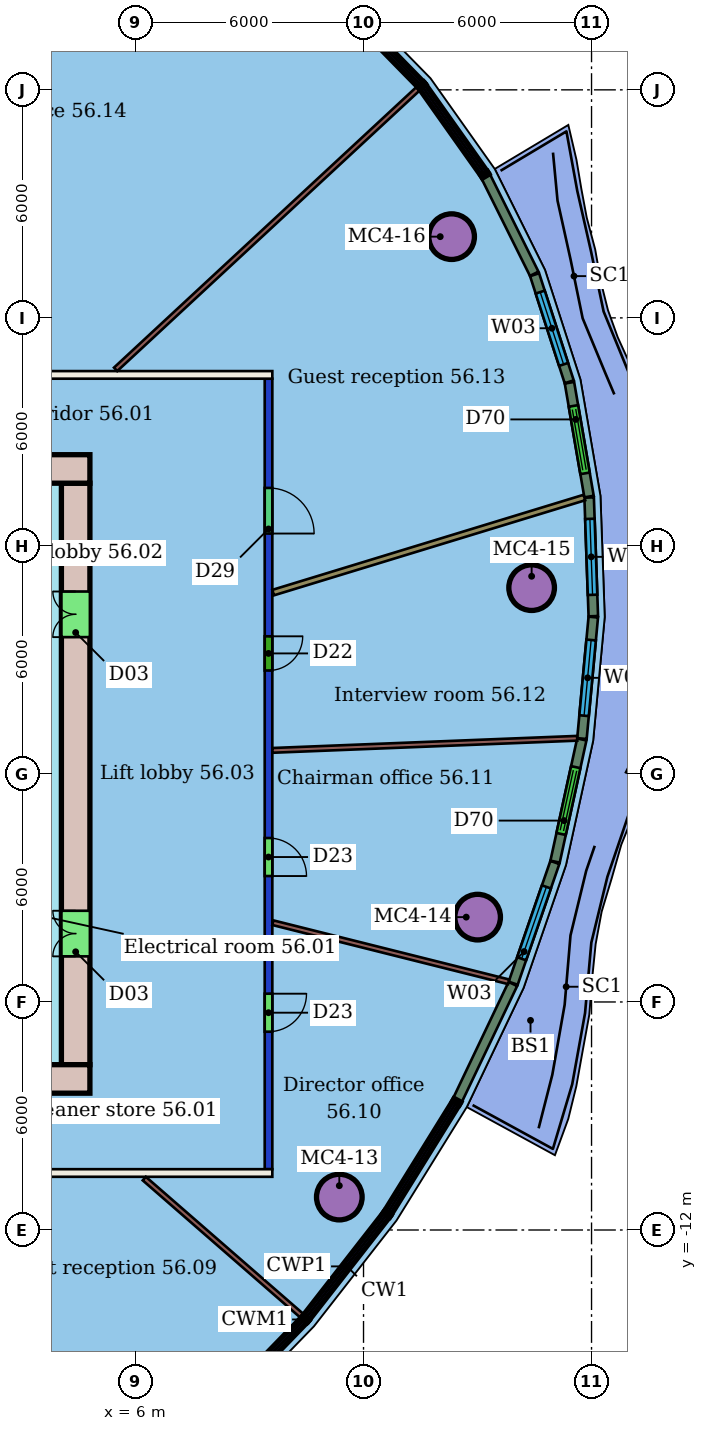
"""IFC4 building model, lengths in metres.
Left out: names, types, materials, properties, quantities, classifications, styles, units other than length and angle.
Written with IfcOpenShell. Run it as: python <this file> out.ifc"""

import sys

from ifc_helpers import new_model, si_unit, direction, frame, frame_2d, origin, origin_2d, place, context, subcontext, project, spatial, rectangle, hollow_circle, extrude, element, fill, save


model = new_model("IFC4")
c1 = context("Model", 3, precision=1e-05, world=origin(), true_north=direction((0.0, 1.0)))
c2 = subcontext(c1, "Body", "Model", "MODEL_VIEW")
j1 = project(units=[si_unit("LENGTHUNIT", "METRE"), si_unit("PLANEANGLEUNIT", "RADIAN")], contexts=[c1])
p1 = place(None, origin())
s1 = spatial("IfcSite", under=j1, at=p1, CompositionType="ELEMENT")
p2 = place(p1, origin())
s2 = spatial("IfcBuilding", under=s1, at=p2, CompositionType="ELEMENT")
p3 = place(p2, frame((0.0, 0.0, 228.1)))
s3 = spatial("IfcBuildingStorey", under=s2, at=p3, CompositionType="ELEMENT", Elevation=228.1)
for number, where, z_axis, x_axis in (
    (1, (11.363, -11.134, 0.0), (0.0, 0.0, 1.0), (1.0, 0.0, 0.0)),
    (2, (15.003, -3.768, 0.0), (0.0, 0.0, 1.0), (1.0, 0.0, 0.0)),
    (3, (16.424, 4.901, 0.0), (0.0, 0.0, 1.0), (1.0, 0.0, 0.0)),
    (4, (14.318, 14.137, 0.0), (0.0, 0.0, 1.0), (1.0, 0.0, 0.0)),
):
    element("IfcColumn", number, at=place(p3, frame(where, z_axis=z_axis, x_axis=x_axis)), inside=s3, PredefinedType="COLUMN", context=c2, shape_type="SweptSolid", body=[
        extrude(hollow_circle(Radius=0.6, WallThickness=0.045, at=origin_2d()), origin(), (0.0, 0.0, 1.0), 3.45),
    ])
p4 = place(p3, frame((9.6, -10.5, 0.0), z_axis=(0.0, 0.0, 1.0), x_axis=(-1.0, 0.0, 0.0)))
e5 = element("IfcWall", 5, at=p4, inside=s3, PredefinedType="PARTITIONING", context=c2, shape_type="SweptSolid", body=[
    extrude(rectangle(XDim=31.2, YDim=0.2, at=frame_2d((15.6, 0.0))), origin(), (0.0, 0.0, 1.0), 3.45),
])
p5 = place(p4, frame((26.604, 0.0, 0.0)))
e6 = element("IfcOpeningElement", 6, at=p5, cuts=e5, PredefinedType="OPENING", context=c2, shape_type="SweptSolid", body=[
    extrude(rectangle(XDim=1.0, YDim=2.4, at=frame_2d((0.5, 1.2))), frame((0.0, 0.11, 0.0), z_axis=(0.0, -1.0, 0.0), x_axis=(1.0, 0.0, 0.0)), (0.0, 0.0, 1.0), 0.22),
])
p6 = place(p4, frame((20.195, 0.0, 0.0)))
e7 = element("IfcOpeningElement", 7, at=p6, cuts=e5, PredefinedType="OPENING", context=c2, shape_type="SweptSolid", body=[
    extrude(rectangle(XDim=1.5, YDim=2.1, at=frame_2d((0.75, 1.05))), frame((0.0, 0.11, 0.0), z_axis=(0.0, -1.0, 0.0), x_axis=(1.0, 0.0, 0.0)), (0.0, 0.0, 1.0), 0.22),
])
p7 = place(p4, frame((16.532, 0.0, 0.0)))
e8 = element("IfcOpeningElement", 8, at=p7, cuts=e5, PredefinedType="OPENING", context=c2, shape_type="SweptSolid", body=[
    extrude(rectangle(XDim=1.0, YDim=2.4, at=frame_2d((0.5, 1.2))), frame((0.0, 0.11, 0.0), z_axis=(0.0, -1.0, 0.0), x_axis=(1.0, 0.0, 0.0)), (0.0, 0.0, 1.0), 0.22),
])
p8 = place(p4, frame((10.772, 0.0, 0.0)))
e9 = element("IfcOpeningElement", 9, at=p8, cuts=e5, PredefinedType="OPENING", context=c2, shape_type="SweptSolid", body=[
    extrude(rectangle(XDim=0.9, YDim=2.1, at=frame_2d((0.45, 1.05))), frame((0.0, 0.11, 0.0), z_axis=(0.0, -1.0, 0.0), x_axis=(1.0, 0.0, 0.0)), (0.0, 0.0, 1.0), 0.22),
])
p9 = place(p4, frame((6.524, 0.0, 0.0)))
e10 = element("IfcOpeningElement", 10, at=p9, cuts=e5, PredefinedType="OPENING", context=c2, shape_type="SweptSolid", body=[
    extrude(rectangle(XDim=1.2, YDim=2.4, at=frame_2d((0.6, 1.2))), frame((0.0, 0.11, 0.0), z_axis=(0.0, -1.0, 0.0), x_axis=(1.0, 0.0, 0.0)), (0.0, 0.0, 1.0), 0.22),
])
p10 = place(p3, frame((-21.6, 10.5, 0.0), z_axis=(0.0, 0.0, 1.0), x_axis=(1.0, 0.0, 0.0)))
e11 = element("IfcWall", 11, at=p10, inside=s3, PredefinedType="PARTITIONING", context=c2, shape_type="SweptSolid", body=[
    extrude(rectangle(XDim=31.2, YDim=0.2, at=frame_2d((15.6, 0.0))), origin(), (0.0, 0.0, 1.0), 3.45),
])
p11 = place(p10, frame((11.157, 0.0, 0.0)))
e12 = element("IfcOpeningElement", 12, at=p11, cuts=e11, PredefinedType="OPENING", context=c2, shape_type="SweptSolid", body=[
    extrude(rectangle(XDim=1.0, YDim=2.4, at=frame_2d((0.5, 1.2))), frame((0.0, 0.11, 0.0), z_axis=(0.0, -1.0, 0.0), x_axis=(1.0, 0.0, 0.0)), (0.0, 0.0, 1.0), 0.22),
])
p12 = place(p10, frame((5.712, 0.0, 0.0)))
e13 = element("IfcOpeningElement", 13, at=p12, cuts=e11, PredefinedType="OPENING", context=c2, shape_type="SweptSolid", body=[
    extrude(rectangle(XDim=0.9, YDim=2.1, at=frame_2d((0.45, 1.05))), frame((0.0, 0.11, 0.0), z_axis=(0.0, -1.0, 0.0), x_axis=(1.0, 0.0, 0.0)), (0.0, 0.0, 1.0), 0.22),
])
p13 = place(p10, frame((18.9, 0.0, 0.0)))
e14 = element("IfcOpeningElement", 14, at=p13, cuts=e11, PredefinedType="OPENING", context=c2, shape_type="SweptSolid", body=[
    extrude(rectangle(XDim=1.8, YDim=2.1, at=frame_2d((0.9, 1.05))), frame((0.0, 0.11, 0.0), z_axis=(0.0, -1.0, 0.0), x_axis=(1.0, 0.0, 0.0)), (0.0, 0.0, 1.0), 0.22),
])
p14 = place(p3, frame((9.5, 10.4, 0.0), z_axis=(0.0, 0.0, 1.0), x_axis=(0.0, -1.0, 0.0)))
e15 = element("IfcWall", 15, at=p14, inside=s3, PredefinedType="PARTITIONING", context=c2, shape_type="SweptSolid", body=[
    extrude(rectangle(XDim=20.8, YDim=0.2, at=frame_2d((10.4, 0.0))), origin(), (0.0, 0.0, 1.0), 3.05),
])
p15 = place(p14, frame((16.182, 0.0, 0.0)))
e16 = element("IfcOpeningElement", 16, at=p15, cuts=e15, PredefinedType="OPENING", context=c2, shape_type="SweptSolid", body=[
    extrude(rectangle(XDim=1.0, YDim=2.4, at=frame_2d((0.5, 1.2))), frame((0.0, 0.11, 0.0), z_axis=(0.0, -1.0, 0.0), x_axis=(1.0, 0.0, 0.0)), (0.0, 0.0, 1.0), 0.22),
])
p16 = place(p14, frame((12.086, 0.0, 0.0)))
e17 = element("IfcOpeningElement", 17, at=p16, cuts=e15, PredefinedType="OPENING", context=c2, shape_type="SweptSolid", body=[
    extrude(rectangle(XDim=1.0, YDim=2.4, at=frame_2d((0.5, 1.2))), frame((0.0, 0.11, 0.0), z_axis=(0.0, -1.0, 0.0), x_axis=(1.0, 0.0, 0.0)), (0.0, 0.0, 1.0), 0.22),
])
p17 = place(p14, frame((6.779, 0.0, 0.0)))
e18 = element("IfcOpeningElement", 18, at=p17, cuts=e15, PredefinedType="OPENING", context=c2, shape_type="SweptSolid", body=[
    extrude(rectangle(XDim=0.9, YDim=2.1, at=frame_2d((0.45, 1.05))), frame((0.0, 0.11, 0.0), z_axis=(0.0, -1.0, 0.0), x_axis=(1.0, 0.0, 0.0)), (0.0, 0.0, 1.0), 0.22),
])
p18 = place(p14, frame((2.875, 0.0, 0.0)))
e19 = element("IfcOpeningElement", 19, at=p18, cuts=e15, PredefinedType="OPENING", context=c2, shape_type="SweptSolid", body=[
    extrude(rectangle(XDim=1.2, YDim=2.4, at=frame_2d((0.6, 1.2))), frame((0.0, 0.11, 0.0), z_axis=(0.0, -1.0, 0.0), x_axis=(1.0, 0.0, 0.0)), (0.0, 0.0, 1.0), 0.22),
])
p19 = place(p3, frame((5.283, -18.97, 0.0), z_axis=(0.0, 0.0, 1.0), x_axis=(-0.511199592551, 0.859462027419, 0.0)))
e20 = element("IfcWall", 20, at=p19, inside=s3, PredefinedType="PARTITIONING", context=c2, shape_type="SweptSolid", body=[
    extrude(rectangle(XDim=9.695, YDim=0.15, at=frame_2d((4.847, 0.0))), origin(), (0.0, 0.0, 1.0), 3.45),
])
p20 = place(p3, frame((10.375, -14.255, 0.0), z_axis=(0.0, 0.0, 1.0), x_axis=(-0.754250521581, 0.656586742704, 0.0)))
e21 = element("IfcWall", 21, at=p20, inside=s3, PredefinedType="PARTITIONING", context=c2, shape_type="SweptSolid", body=[
    extrude(rectangle(XDim=5.495, YDim=0.125, at=frame_2d((2.747, 0.0))), origin(), (0.0, 0.0, 1.0), 3.45),
])
p21 = place(p3, frame((15.819, -5.469, 0.0), z_axis=(0.0, 0.0, 1.0), x_axis=(-0.969994115185, 0.243128395105, 0.0)))
e22 = element("IfcWall", 22, at=p21, inside=s3, PredefinedType="PARTITIONING", context=c2, shape_type="SweptSolid", body=[
    extrude(rectangle(XDim=6.396, YDim=0.125, at=frame_2d((3.198, 0.0))), origin(), (0.0, 0.0, 1.0), 3.45),
])
p22 = place(p3, frame((17.623, 0.938, 0.0), z_axis=(0.0, 0.0, 1.0), x_axis=(-0.99921190204, -0.03969351107, 0.0)))
e23 = element("IfcWall", 23, at=p22, inside=s3, PredefinedType="PARTITIONING", context=c2, shape_type="SweptSolid", body=[
    extrude(rectangle(XDim=8.027, YDim=0.125, at=frame_2d((4.013, 0.0))), origin(), (0.0, 0.0, 1.0), 3.45),
])
p23 = place(p3, frame((17.812, 7.273, 0.0), z_axis=(0.0, 0.0, 1.0), x_axis=(-0.956387195005, -0.292101922676, 0.0)))
e24 = element("IfcWall", 24, at=p23, inside=s3, PredefinedType="PARTITIONING", context=c2, shape_type="SweptSolid", body=[
    extrude(rectangle(XDim=8.564, YDim=0.15, at=frame_2d((4.282, 0.0))), origin(), (0.0, 0.0, 1.0), 3.45),
])
p24 = place(p3, frame((13.437, 18.031, 0.0), z_axis=(0.0, 0.0, 1.0), x_axis=(-0.733128123603, -0.680090548665, 0.0)))
e25 = element("IfcWall", 25, at=p24, inside=s3, PredefinedType="PARTITIONING", context=c2, shape_type="SweptSolid", body=[
    extrude(rectangle(XDim=10.859, YDim=0.125, at=frame_2d((5.429, 0.0))), origin(), (0.0, 0.0, 1.0), 3.45),
])
p25 = place(p3, frame((14.478, -8.572, 0.0), z_axis=(0.0, 0.0, 1.0), x_axis=(0.430461639922, 0.902608872411, 0.0)))
e26 = element("IfcWall", 26, at=p25, inside=s3, PredefinedType="SOLIDWALL", context=c2, shape_type="SweptSolid", body=[
    extrude(rectangle(XDim=3.374, YDim=0.25, at=frame_2d((1.687, 0.0))), origin(), (0.0, 0.0, 1.0), 3.1),
])
p26 = place(p3, frame((15.938, -5.506, 0.0), z_axis=(0.0, 0.0, 1.0), x_axis=(0.326124986631, 0.945326659465, 0.0)))
e27 = element("IfcWall", 27, at=p26, inside=s3, PredefinedType="SOLIDWALL", context=c2, shape_type="SweptSolid", body=[
    extrude(rectangle(XDim=3.361, YDim=0.25, at=frame_2d((1.681, 0.0))), origin(), (0.0, 0.0, 1.0), 3.1),
])
p27 = place(p26, frame((0.681, 0.0, 0.9)))
e28 = element("IfcOpeningElement", 28, at=p27, cuts=e27, PredefinedType="OPENING", context=c2, shape_type="SweptSolid", body=[
    extrude(rectangle(XDim=2.0, YDim=2.1, at=frame_2d((1.0, 1.05))), frame((0.0, 0.135, 0.0), z_axis=(0.0, -1.0, 0.0), x_axis=(1.0, 0.0, 0.0)), (0.0, 0.0, 1.0), 0.27),
])
p28 = place(p3, frame((17.041, -2.307, 0.0), z_axis=(0.0, 0.0, 1.0), x_axis=(0.213732278163, 0.976892273115, 0.0)))
e29 = element("IfcWall", 29, at=p28, inside=s3, PredefinedType="SOLIDWALL", context=c2, shape_type="SweptSolid", body=[
    extrude(rectangle(XDim=3.291, YDim=0.25, at=frame_2d((1.646, 0.0))), origin(), (0.0, 0.0, 1.0), 3.1),
])
p29 = place(p28, frame((0.745, 0.0, 0.0)))
e30 = element("IfcOpeningElement", 30, at=p29, cuts=e29, PredefinedType="OPENING", context=c2, shape_type="SweptSolid", body=[
    extrude(rectangle(XDim=1.8, YDim=2.4, at=frame_2d((0.9, 1.2))), frame((0.0, 0.135, 0.0), z_axis=(0.0, -1.0, 0.0), x_axis=(1.0, 0.0, 0.0)), (0.0, 0.0, 1.0), 0.27),
])
p30 = place(p3, frame((17.747, 0.931, 0.0), z_axis=(0.0, 0.0, 1.0), x_axis=(0.093086270193, 0.995658046872, 0.0)))
e31 = element("IfcWall", 31, at=p30, inside=s3, PredefinedType="SOLIDWALL", context=c2, shape_type="SweptSolid", body=[
    extrude(rectangle(XDim=3.21, YDim=0.25, at=frame_2d((1.605, 0.0))), origin(), (0.0, 0.0, 1.0), 3.1),
])
p31 = place(p30, frame((0.605, 0.0, 0.9)))
e32 = element("IfcOpeningElement", 32, at=p31, cuts=e31, PredefinedType="OPENING", context=c2, shape_type="SweptSolid", body=[
    extrude(rectangle(XDim=2.0, YDim=2.1, at=frame_2d((1.0, 1.05))), frame((0.0, 0.135, 0.0), z_axis=(0.0, -1.0, 0.0), x_axis=(1.0, 0.0, 0.0)), (0.0, 0.0, 1.0), 0.27),
])
p32 = place(p3, frame((18.047, 4.151, 0.0), z_axis=(0.0, 0.0, 1.0), x_axis=(-0.035161980599, 0.999381626367, 0.0)))
e33 = element("IfcWall", 33, at=p32, inside=s3, PredefinedType="SOLIDWALL", context=c2, shape_type="SweptSolid", body=[
    extrude(rectangle(XDim=3.125, YDim=0.25, at=frame_2d((1.562, 0.0))), origin(), (0.0, 0.0, 1.0), 3.1),
])
p33 = place(p32, frame((0.562, 0.0, 0.9)))
e34 = element("IfcOpeningElement", 34, at=p33, cuts=e33, PredefinedType="OPENING", context=c2, shape_type="SweptSolid", body=[
    extrude(rectangle(XDim=2.0, YDim=2.1, at=frame_2d((1.0, 1.05))), frame((0.0, 0.135, 0.0), z_axis=(0.0, -1.0, 0.0), x_axis=(1.0, 0.0, 0.0)), (0.0, 0.0, 1.0), 0.27),
])
p34 = place(p3, frame((17.934, 7.298, 0.0), z_axis=(0.0, 0.0, 1.0), x_axis=(-0.169645994058, 0.985505066806, 0.0)))
e35 = element("IfcWall", 35, at=p34, inside=s3, PredefinedType="SOLIDWALL", context=c2, shape_type="SweptSolid", body=[
    extrude(rectangle(XDim=3.039, YDim=0.25, at=frame_2d((1.52, 0.0))), origin(), (0.0, 0.0, 1.0), 3.1),
])
p35 = place(p34, frame((0.62, 0.0, 0.0)))
e36 = element("IfcOpeningElement", 36, at=p35, cuts=e35, PredefinedType="OPENING", context=c2, shape_type="SweptSolid", body=[
    extrude(rectangle(XDim=1.8, YDim=2.4, at=frame_2d((0.9, 1.2))), frame((0.0, 0.135, 0.0), z_axis=(0.0, -1.0, 0.0), x_axis=(1.0, 0.0, 0.0)), (0.0, 0.0, 1.0), 0.27),
])
p36 = place(p3, frame((17.413, 10.319, 0.0), z_axis=(0.0, 0.0, 1.0), x_axis=(-0.307706130581, 0.951481443436, 0.0)))
e37 = element("IfcWall", 37, at=p36, inside=s3, PredefinedType="SOLIDWALL", context=c2, shape_type="SweptSolid", body=[
    extrude(rectangle(XDim=2.961, YDim=0.25, at=frame_2d((1.48, 0.0))), origin(), (0.0, 0.0, 1.0), 3.1),
])
p37 = place(p36, frame((0.48, 0.0, 0.9)))
e38 = element("IfcOpeningElement", 38, at=p37, cuts=e37, PredefinedType="OPENING", context=c2, shape_type="SweptSolid", body=[
    extrude(rectangle(XDim=2.0, YDim=2.1, at=frame_2d((1.0, 1.05))), frame((0.0, 0.135, 0.0), z_axis=(0.0, -1.0, 0.0), x_axis=(1.0, 0.0, 0.0)), (0.0, 0.0, 1.0), 0.27),
])
p38 = place(p3, frame((16.491, 13.16, 0.0), z_axis=(0.0, 0.0, 1.0), x_axis=(-0.445536061048, 0.895263993639, 0.0)))
e39 = element("IfcWall", 39, at=p38, inside=s3, PredefinedType="SOLIDWALL", context=c2, shape_type="SweptSolid", body=[
    extrude(rectangle(XDim=2.854, YDim=0.25, at=frame_2d((1.427, 0.0))), origin(), (0.0, 0.0, 1.0), 3.1),
])
p39 = place(p3, frame((4.8, 8.025, 0.0), z_axis=(0.0, 0.0, 1.0), x_axis=(-1.0, 0.0, 0.0)))
e40 = element("IfcWall", 40, at=p39, inside=s3, PredefinedType="SHEAR", context=c2, shape_type="SweptSolid", body=[
    extrude(rectangle(XDim=10.8, YDim=0.75, at=frame_2d((5.4, 0.0))), origin(), (0.0, 0.0, 1.0), 3.3),
])
p40 = place(p39, frame((4.4, 0.0, 0.0)))
e41 = element("IfcOpeningElement", 41, at=p40, cuts=e40, PredefinedType="OPENING", context=c2, shape_type="SweptSolid", body=[
    extrude(rectangle(XDim=1.2, YDim=2.1, at=frame_2d((0.6, 1.05))), frame((0.0, 0.385, 0.0), z_axis=(0.0, -1.0, 0.0), x_axis=(1.0, 0.0, 0.0)), (0.0, 0.0, 1.0), 0.77),
])
p41 = place(p3, frame((-16.8, -8.025, 0.0), z_axis=(0.0, 0.0, 1.0), x_axis=(1.0, 0.0, 0.0)))
e42 = element("IfcWall", 42, at=p41, inside=s3, PredefinedType="SHEAR", context=c2, shape_type="SweptSolid", body=[
    extrude(rectangle(XDim=21.6, YDim=0.75, at=frame_2d((10.8, 0.0))), origin(), (0.0, 0.0, 1.0), 3.3),
])
p42 = place(p41, frame((4.8, 0.0, 0.0)))
e43 = element("IfcOpeningElement", 43, at=p42, cuts=e42, PredefinedType="OPENING", context=c2, shape_type="SweptSolid", body=[
    extrude(rectangle(XDim=1.2, YDim=2.1, at=frame_2d((0.6, 1.05))), frame((0.0, 0.385, 0.0), z_axis=(0.0, -1.0, 0.0), x_axis=(1.0, 0.0, 0.0)), (0.0, 0.0, 1.0), 0.77),
])
p43 = place(p3, frame((4.425, -7.65, 0.0), z_axis=(0.0, 0.0, 1.0), x_axis=(0.0, 1.0, 0.0)))
e44 = element("IfcWall", 44, at=p43, inside=s3, PredefinedType="SHEAR", context=c2, shape_type="SweptSolid", body=[
    extrude(rectangle(XDim=15.3, YDim=0.75, at=frame_2d((7.65, 0.0))), origin(), (0.0, 0.0, 1.0), 3.3),
])
p44 = place(p43, frame((2.85, 0.0, 0.0)))
e45 = element("IfcOpeningElement", 45, at=p44, cuts=e44, PredefinedType="OPENING", context=c2, shape_type="SweptSolid", body=[
    extrude(rectangle(XDim=1.2, YDim=2.1, at=frame_2d((0.6, 1.05))), frame((0.0, 0.385, 0.0), z_axis=(0.0, -1.0, 0.0), x_axis=(1.0, 0.0, 0.0)), (0.0, 0.0, 1.0), 0.77),
])
p45 = place(p43, frame((11.25, 0.0, 0.0)))
e46 = element("IfcOpeningElement", 46, at=p45, cuts=e44, PredefinedType="OPENING", context=c2, shape_type="SweptSolid", body=[
    extrude(rectangle(XDim=1.2, YDim=2.1, at=frame_2d((0.6, 1.05))), frame((0.0, 0.385, 0.0), z_axis=(0.0, -1.0, 0.0), x_axis=(1.0, 0.0, 0.0)), (0.0, 0.0, 1.0), 0.77),
])
p46 = place(p15, origin())
e47 = element("IfcDoor", 47, at=p46, inside=s3, OperationType="SINGLE_SWING_LEFT", PredefinedType="DOOR", context=c2, shape_type="SweptSolid", body=[
    extrude(rectangle(XDim=1.0, YDim=2.4, at=frame_2d((0.5, 1.2))), frame((0.0, 0.025, 0.0), z_axis=(0.0, -1.0, 0.0), x_axis=(1.0, 0.0, 0.0)), (0.0, 0.0, 1.0), 0.05),
])
fill(e16, e47)
p47 = place(p16, origin())
e48 = element("IfcDoor", 48, at=p47, inside=s3, OperationType="SINGLE_SWING_RIGHT", PredefinedType="DOOR", context=c2, shape_type="SweptSolid", body=[
    extrude(rectangle(XDim=1.0, YDim=2.4, at=frame_2d((0.5, 1.2))), frame((0.0, 0.025, 0.0), z_axis=(0.0, -1.0, 0.0), x_axis=(1.0, 0.0, 0.0)), (0.0, 0.0, 1.0), 0.05),
])
fill(e17, e48)
p48 = place(p17, origin())
e49 = element("IfcDoor", 49, at=p48, inside=s3, OperationType="SINGLE_SWING_LEFT", PredefinedType="DOOR", context=c2, shape_type="SweptSolid", body=[
    extrude(rectangle(XDim=0.9, YDim=2.1, at=frame_2d((0.45, 1.05))), frame((0.0, 0.025, 0.0), z_axis=(0.0, -1.0, 0.0), x_axis=(1.0, 0.0, 0.0)), (0.0, 0.0, 1.0), 0.05),
])
fill(e18, e49)
p49 = place(p18, origin())
e50 = element("IfcDoor", 50, at=p49, inside=s3, OperationType="SINGLE_SWING_RIGHT", PredefinedType="DOOR", context=c2, shape_type="SweptSolid", body=[
    extrude(rectangle(XDim=1.2, YDim=2.4, at=frame_2d((0.6, 1.2))), frame((0.0, 0.025, 0.0), z_axis=(0.0, -1.0, 0.0), x_axis=(1.0, 0.0, 0.0)), (0.0, 0.0, 1.0), 0.05),
])
fill(e19, e50)
p50 = place(p27, origin())
e51 = element("IfcWindow", 51, at=p50, inside=s3, PartitioningType="SINGLE_PANEL", PredefinedType="WINDOW", context=c2, shape_type="SweptSolid", body=[
    extrude(rectangle(XDim=2.0, YDim=2.1, at=frame_2d((1.0, 1.05))), frame((0.0, 0.03, 0.0), z_axis=(0.0, -1.0, 0.0), x_axis=(1.0, 0.0, 0.0)), (0.0, 0.0, 1.0), 0.06),
])
fill(e28, e51)
p51 = place(p29, origin())
e52 = element("IfcDoor", 52, at=p51, inside=s3, OperationType="DOUBLE_DOOR_SLIDING", PredefinedType="DOOR", context=c2, shape_type="SweptSolid", body=[
    extrude(rectangle(XDim=1.8, YDim=2.4, at=frame_2d((0.9, 1.2))), frame((0.0, 0.025, 0.0), z_axis=(0.0, -1.0, 0.0), x_axis=(1.0, 0.0, 0.0)), (0.0, 0.0, 1.0), 0.05),
])
fill(e30, e52)
p52 = place(p31, origin())
e53 = element("IfcWindow", 53, at=p52, inside=s3, PartitioningType="SINGLE_PANEL", PredefinedType="WINDOW", context=c2, shape_type="SweptSolid", body=[
    extrude(rectangle(XDim=2.0, YDim=2.1, at=frame_2d((1.0, 1.05))), frame((0.0, 0.03, 0.0), z_axis=(0.0, -1.0, 0.0), x_axis=(1.0, 0.0, 0.0)), (0.0, 0.0, 1.0), 0.06),
])
fill(e32, e53)
p53 = place(p33, origin())
e54 = element("IfcWindow", 54, at=p53, inside=s3, PartitioningType="SINGLE_PANEL", PredefinedType="WINDOW", context=c2, shape_type="SweptSolid", body=[
    extrude(rectangle(XDim=2.0, YDim=2.1, at=frame_2d((1.0, 1.05))), frame((0.0, 0.03, 0.0), z_axis=(0.0, -1.0, 0.0), x_axis=(1.0, 0.0, 0.0)), (0.0, 0.0, 1.0), 0.06),
])
fill(e34, e54)
p54 = place(p35, origin())
e55 = element("IfcDoor", 55, at=p54, inside=s3, OperationType="DOUBLE_DOOR_SLIDING", PredefinedType="DOOR", context=c2, shape_type="SweptSolid", body=[
    extrude(rectangle(XDim=1.8, YDim=2.4, at=frame_2d((0.9, 1.2))), frame((0.0, 0.025, 0.0), z_axis=(0.0, -1.0, 0.0), x_axis=(1.0, 0.0, 0.0)), (0.0, 0.0, 1.0), 0.05),
])
fill(e36, e55)
p55 = place(p37, origin())
e56 = element("IfcWindow", 56, at=p55, inside=s3, PartitioningType="SINGLE_PANEL", PredefinedType="WINDOW", context=c2, shape_type="SweptSolid", body=[
    extrude(rectangle(XDim=2.0, YDim=2.1, at=frame_2d((1.0, 1.05))), frame((0.0, 0.03, 0.0), z_axis=(0.0, -1.0, 0.0), x_axis=(1.0, 0.0, 0.0)), (0.0, 0.0, 1.0), 0.06),
])
fill(e38, e56)
p56 = place(p44, origin())
e57 = element("IfcDoor", 57, at=p56, inside=s3, OperationType="DOUBLE_DOOR_SINGLE_SWING", PredefinedType="NOTDEFINED", context=c2, shape_type="SweptSolid", body=[
    extrude(rectangle(XDim=1.2, YDim=2.1, at=frame_2d((0.6, 1.05))), frame((0.0, 0.025, 0.0), z_axis=(0.0, -1.0, 0.0), x_axis=(1.0, 0.0, 0.0)), (0.0, 0.0, 1.0), 0.05),
])
fill(e45, e57)
p57 = place(p45, origin())
e58 = element("IfcDoor", 58, at=p57, inside=s3, OperationType="DOUBLE_DOOR_SINGLE_SWING", PredefinedType="NOTDEFINED", context=c2, shape_type="SweptSolid", body=[
    extrude(rectangle(XDim=1.2, YDim=2.1, at=frame_2d((0.6, 1.05))), frame((0.0, 0.025, 0.0), z_axis=(0.0, -1.0, 0.0), x_axis=(1.0, 0.0, 0.0)), (0.0, 0.0, 1.0), 0.05),
])
fill(e46, e58)
save(model, sys.argv[1])
